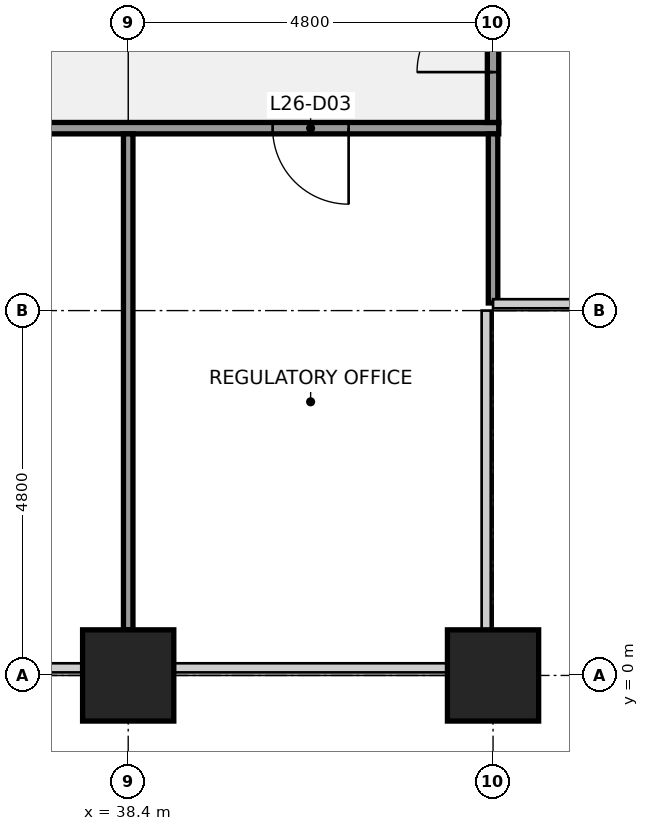
"""IFC4 building model, lengths in metres.
Left out: names, types, materials, properties, quantities, classifications, styles, units other than length and angle.
Written with IfcOpenShell. Run it as: python <this file> out.ifc"""

import sys

from ifc_helpers import new_model, si_unit, direction, frame, frame_2d, origin, origin_2d, place, context, subcontext, project, spatial, rectangle, extrude, element, fill, save


model = new_model("IFC4")
c1 = context("Model", 3, precision=1e-05, world=origin(), true_north=direction((0.0, 1.0)))
c2 = subcontext(c1, "Body", "Model", "MODEL_VIEW")
j1 = project(units=[si_unit("LENGTHUNIT", "METRE"), si_unit("PLANEANGLEUNIT", "RADIAN")], contexts=[c1])
p1 = place(None, origin())
s1 = spatial("IfcSite", under=j1, at=p1, CompositionType="ELEMENT")
p2 = place(p1, origin())
s2 = spatial("IfcBuilding", under=s1, at=p2, CompositionType="ELEMENT")
p3 = place(p2, frame((0.0, 0.0, 124.1)))
s3 = spatial("IfcBuildingStorey", under=s2, at=p3, CompositionType="ELEMENT", Elevation=124.1)
for number, where, z_axis, x_axis in (
    (1, (38.4, 0.0, 0.0), (0.0, 0.0, 1.0), (1.0, 0.0, 0.0)),
    (2, (43.2, 0.0, 0.0), (0.0, 0.0, 1.0), (1.0, 0.0, 0.0)),
):
    element("IfcColumn", number, at=place(p3, frame(where, z_axis=z_axis, x_axis=x_axis)), inside=s3, PredefinedType="COLUMN", context=c2, shape_type="SweptSolid", body=[
        extrude(rectangle(XDim=1.2, YDim=1.2, at=origin_2d()), origin(), (0.0, 0.0, 1.0), 4.0),
    ])
p4 = place(p3, frame((14.325, 7.2, 0.0), z_axis=(0.0, 0.0, 1.0), x_axis=(1.0, 0.0, 0.0)))
e3 = element("IfcWall", 3, at=p4, inside=s3, PredefinedType="PARTITIONING", context=c2, shape_type="SweptSolid", body=[
    extrude(rectangle(XDim=28.95, YDim=0.15, at=frame_2d((14.475, 0.0))), origin(), (0.0, 0.0, 1.0), 2.849),
])
p5 = place(p4, frame((1.975, 0.0, 0.0)))
e4 = element("IfcOpeningElement", 4, at=p5, cuts=e3, PredefinedType="OPENING", context=c2, shape_type="SweptSolid", body=[
    extrude(rectangle(XDim=1.0, YDim=2.1, at=frame_2d((0.5, 1.05))), frame((0.0, 0.085, 0.0), z_axis=(0.0, -1.0, 0.0), x_axis=(1.0, 0.0, 0.0)), (0.0, 0.0, 1.0), 0.17),
])
p6 = place(p4, frame((13.975, 0.0, 0.0)))
e5 = element("IfcOpeningElement", 5, at=p6, cuts=e3, PredefinedType="OPENING", context=c2, shape_type="SweptSolid", body=[
    extrude(rectangle(XDim=1.0, YDim=2.1, at=frame_2d((0.5, 1.05))), frame((0.0, 0.085, 0.0), z_axis=(0.0, -1.0, 0.0), x_axis=(1.0, 0.0, 0.0)), (0.0, 0.0, 1.0), 0.17),
])
p7 = place(p4, frame((25.975, 0.0, 0.0)))
e6 = element("IfcOpeningElement", 6, at=p7, cuts=e3, PredefinedType="OPENING", context=c2, shape_type="SweptSolid", body=[
    extrude(rectangle(XDim=1.0, YDim=2.1, at=frame_2d((0.5, 1.05))), frame((0.0, 0.085, 0.0), z_axis=(0.0, -1.0, 0.0), x_axis=(1.0, 0.0, 0.0)), (0.0, 0.0, 1.0), 0.17),
])
p8 = place(p3, frame((38.4, 0.6, 0.0), z_axis=(0.0, 0.0, 1.0), x_axis=(0.0, 1.0, 0.0)))
e7 = element("IfcWall", 7, at=p8, inside=s3, PredefinedType="PARTITIONING", context=c2, shape_type="SweptSolid", body=[
    extrude(rectangle(XDim=6.525, YDim=0.125, at=frame_2d((3.262, 0.0))), origin(), (0.0, 0.0, 1.0), 2.849),
])
p9 = place(p3, frame((43.2, 4.9, 0.0), z_axis=(0.0, 0.0, 1.0), x_axis=(0.0, 1.0, 0.0)))
e8 = element("IfcWall", 8, at=p9, inside=s3, PredefinedType="PARTITIONING", context=c2, shape_type="SweptSolid", body=[
    extrude(rectangle(XDim=2.225, YDim=0.125, at=frame_2d((1.113, 0.0))), origin(), (0.0, 0.0, 1.0), 2.849),
])
p10 = place(p3, frame((43.2, 7.275, 0.0), z_axis=(0.0, 0.0, 1.0), x_axis=(0.0, 1.0, 0.0)))
e9 = element("IfcWall", 9, at=p10, inside=s3, PredefinedType="PARTITIONING", context=c2, shape_type="SweptSolid", body=[
    extrude(rectangle(XDim=2.325, YDim=0.15, at=frame_2d((1.163, 0.0))), origin(), (0.0, 0.0, 1.0), 2.849),
])
p11 = place(p10, frame((0.663, 0.0, 0.0)))
e10 = element("IfcOpeningElement", 10, at=p11, cuts=e9, PredefinedType="OPENING", context=c2, shape_type="SweptSolid", body=[
    extrude(rectangle(XDim=1.0, YDim=2.1, at=frame_2d((0.5, 1.05))), frame((0.0, 0.085, 0.0), z_axis=(0.0, -1.0, 0.0), x_axis=(1.0, 0.0, 0.0)), (0.0, 0.0, 1.0), 0.17),
])
for number, where, z_axis, x_axis in (
    (11, (38.4, -1.05, 0.0), (0.0, 0.0, 1.0), (1.0, 0.0, 0.0)),
    (12, (43.2, -1.05, 0.0), (0.0, 0.0, 1.0), (1.0, 0.0, 0.0)),
):
    element("IfcColumn", number, at=place(p3, frame(where, z_axis=z_axis, x_axis=x_axis)), inside=s3, PredefinedType="PILASTER", context=c2, shape_type="SweptSolid", body=[
        extrude(rectangle(XDim=3.6, YDim=0.9, at=origin_2d()), origin(), (0.0, 0.0, 1.0), 4.0),
    ])
p12 = place(p7, origin())
e13 = element("IfcDoor", 13, at=p12, inside=s3, OperationType="SINGLE_SWING_RIGHT", PredefinedType="DOOR", context=c2, shape_type="SweptSolid", body=[
    extrude(rectangle(XDim=1.0, YDim=2.1, at=frame_2d((0.5, 1.05))), frame((0.0, 0.025, 0.0), z_axis=(0.0, -1.0, 0.0), x_axis=(1.0, 0.0, 0.0)), (0.0, 0.0, 1.0), 0.05),
])
fill(e6, e13)
p13 = place(p11, origin())
e14 = element("IfcDoor", 14, at=p13, inside=s3, OperationType="SINGLE_SWING_LEFT", PredefinedType="DOOR", context=c2, shape_type="SweptSolid", body=[
    extrude(rectangle(XDim=1.0, YDim=2.1, at=frame_2d((0.5, 1.05))), frame((0.0, 0.025, 0.0), z_axis=(0.0, -1.0, 0.0), x_axis=(1.0, 0.0, 0.0)), (0.0, 0.0, 1.0), 0.05),
])
fill(e10, e14)
save(model, sys.argv[1])
